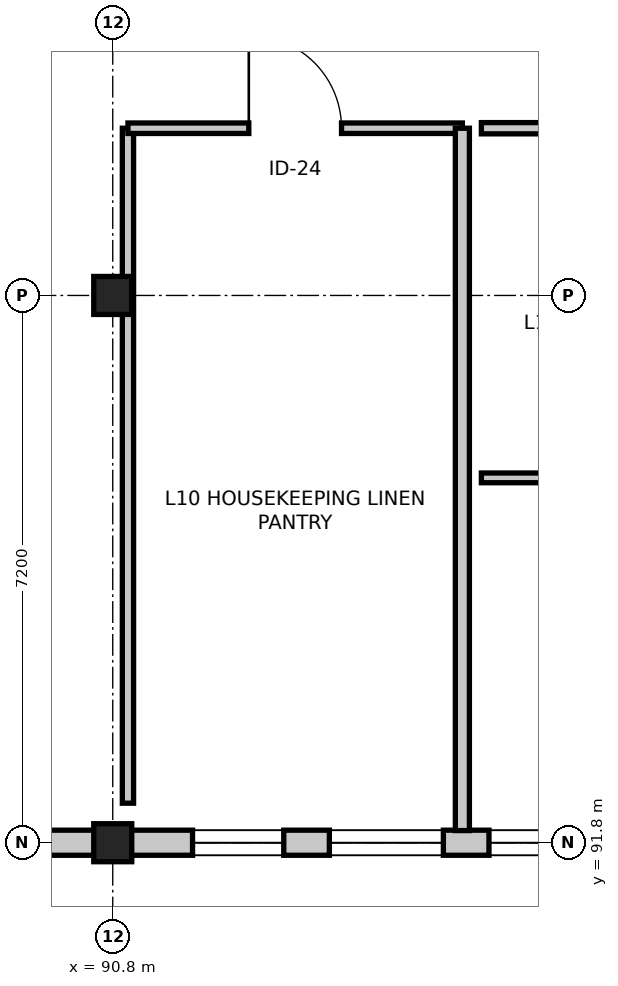
"""IFC4 building model, lengths in metres.
Left out: names, types, materials, properties, quantities, classifications, styles, units other than length and angle.
Written with IfcOpenShell. Run it as: python <this file> out.ifc"""

import sys

from ifc_helpers import new_model, si_unit, direction, frame, frame_2d, origin, origin_2d, place, context, subcontext, project, spatial, rectangle, extrude, element, fill, save


model = new_model("IFC4")
c1 = context("Model", 3, precision=1e-05, world=origin(), true_north=direction((0.0, 1.0)))
c2 = subcontext(c1, "Body", "Model", "MODEL_VIEW")
j1 = project(units=[si_unit("LENGTHUNIT", "METRE"), si_unit("PLANEANGLEUNIT", "RADIAN")], contexts=[c1])
p1 = place(None, origin())
s1 = spatial("IfcSite", under=j1, at=p1, CompositionType="ELEMENT")
p2 = place(p1, origin())
s2 = spatial("IfcBuilding", under=s1, at=p2, CompositionType="ELEMENT")
p3 = place(p2, frame((0.0, 0.0, 40.8)))
s3 = spatial("IfcBuildingStorey", under=s2, at=p3, CompositionType="ELEMENT", Elevation=40.8)
for number, where, z_axis, x_axis in (
    (1, (90.8, 91.8, 0.0), (0.0, 0.0, 1.0), (1.0, 0.0, 0.0)),
    (2, (90.8, 99.0, 0.0), (0.0, 0.0, 1.0), (1.0, 0.0, 0.0)),
):
    element("IfcColumn", number, at=place(p3, frame(where, z_axis=z_axis, x_axis=x_axis)), inside=s3, PredefinedType="COLUMN", context=c2, shape_type="SweptSolid", body=[
        extrude(rectangle(XDim=0.5, YDim=0.5, at=origin_2d()), origin(), (0.0, 0.0, 1.0), 3.6),
    ])
p4 = place(p3, frame((98.0, 91.8, 0.0), z_axis=(0.0, 0.0, 1.0), x_axis=(-1.0, 0.0, 0.0)))
e3 = element("IfcWall", 3, at=p4, inside=s3, PredefinedType="STANDARD", context=c2, shape_type="SweptSolid", body=[
    extrude(rectangle(XDim=7.2, YDim=0.33, at=frame_2d((3.6, 0.0))), origin(), (0.0, 0.0, 1.0), 2.765),
])
p5 = place(p4, frame((2.85, 0.0, 0.75)))
e4 = element("IfcOpeningElement", 4, at=p5, cuts=e3, PredefinedType="OPENING", context=c2, shape_type="SweptSolid", body=[
    extrude(rectangle(XDim=1.5, YDim=1.5, at=frame_2d((0.75, 0.75))), frame((0.0, 0.175, 0.0), z_axis=(0.0, -1.0, 0.0), x_axis=(1.0, 0.0, 0.0)), (0.0, 0.0, 1.0), 0.35),
])
p6 = place(p4, frame((1.05, 0.0, 0.85)))
e5 = element("IfcOpeningElement", 5, at=p6, cuts=e3, PredefinedType="OPENING", context=c2, shape_type="SweptSolid", body=[
    extrude(rectangle(XDim=1.2, YDim=1.8, at=frame_2d((0.6, 0.9))), frame((0.0, 0.175, 0.0), z_axis=(0.0, -1.0, 0.0), x_axis=(1.0, 0.0, 0.0)), (0.0, 0.0, 1.0), 0.35),
])
p7 = place(p4, frame((4.95, 0.0, 0.85)))
e6 = element("IfcOpeningElement", 6, at=p7, cuts=e3, PredefinedType="OPENING", context=c2, shape_type="SweptSolid", body=[
    extrude(rectangle(XDim=1.2, YDim=1.8, at=frame_2d((0.6, 0.9))), frame((0.0, 0.175, 0.0), z_axis=(0.0, -1.0, 0.0), x_axis=(1.0, 0.0, 0.0)), (0.0, 0.0, 1.0), 0.35),
])
p8 = place(p3, frame((90.8, 91.8, 0.0), z_axis=(0.0, 0.0, 1.0), x_axis=(-1.0, 0.0, 0.0)))
e7 = element("IfcWall", 7, at=p8, inside=s3, PredefinedType="STANDARD", context=c2, shape_type="SweptSolid", body=[
    extrude(rectangle(XDim=7.2, YDim=0.33, at=frame_2d((3.6, 0.0))), origin(), (0.0, 0.0, 1.0), 2.765),
])
p9 = place(p8, frame((2.85, 0.0, 0.75)))
e8 = element("IfcOpeningElement", 8, at=p9, cuts=e7, PredefinedType="OPENING", context=c2, shape_type="SweptSolid", body=[
    extrude(rectangle(XDim=1.5, YDim=1.5, at=frame_2d((0.75, 0.75))), frame((0.0, 0.175, 0.0), z_axis=(0.0, -1.0, 0.0), x_axis=(1.0, 0.0, 0.0)), (0.0, 0.0, 1.0), 0.35),
])
p10 = place(p8, frame((1.05, 0.0, 0.85)))
e9 = element("IfcOpeningElement", 9, at=p10, cuts=e7, PredefinedType="OPENING", context=c2, shape_type="SweptSolid", body=[
    extrude(rectangle(XDim=1.2, YDim=1.8, at=frame_2d((0.6, 0.9))), frame((0.0, 0.175, 0.0), z_axis=(0.0, -1.0, 0.0), x_axis=(1.0, 0.0, 0.0)), (0.0, 0.0, 1.0), 0.35),
])
p11 = place(p8, frame((4.95, 0.0, 0.85)))
e10 = element("IfcOpeningElement", 10, at=p11, cuts=e7, PredefinedType="OPENING", context=c2, shape_type="SweptSolid", body=[
    extrude(rectangle(XDim=1.2, YDim=1.8, at=frame_2d((0.6, 0.9))), frame((0.0, 0.175, 0.0), z_axis=(0.0, -1.0, 0.0), x_axis=(1.0, 0.0, 0.0)), (0.0, 0.0, 1.0), 0.35),
])
p12 = place(p3, frame((91.0, 92.32, 0.0), z_axis=(0.0, 0.0, 1.0), x_axis=(0.0, 1.0, 0.0)))
e11 = element("IfcWall", 11, at=p12, inside=s3, PredefinedType="PARTITIONING", context=c2, shape_type="SweptSolid", body=[
    extrude(rectangle(XDim=8.88, YDim=0.148, at=frame_2d((4.44, 0.0))), origin(), (0.0, 0.0, 1.0), 2.715),
])
p13 = place(p3, frame((91.0, 101.2, 0.0), z_axis=(0.0, 0.0, 1.0), x_axis=(1.0, 0.0, 0.0)))
e12 = element("IfcWall", 12, at=p13, inside=s3, PredefinedType="PARTITIONING", context=c2, shape_type="SweptSolid", body=[
    extrude(rectangle(XDim=4.4, YDim=0.138, at=frame_2d((2.2, 0.0))), origin(), (0.0, 0.0, 1.0), 2.715),
])
p14 = place(p13, frame((1.59, 0.0, 0.0)))
e13 = element("IfcOpeningElement", 13, at=p14, cuts=e12, PredefinedType="OPENING", context=c2, shape_type="SweptSolid", body=[
    extrude(rectangle(XDim=1.22, YDim=2.24, at=frame_2d((0.61, 1.12))), frame((0.0, 0.079, 0.0), z_axis=(0.0, -1.0, 0.0), x_axis=(1.0, 0.0, 0.0)), (0.0, 0.0, 1.0), 0.158),
])
p15 = place(p3, frame((95.4, 101.2, 0.0), z_axis=(0.0, 0.0, 1.0), x_axis=(0.0, -1.0, 0.0)))
e14 = element("IfcWall", 14, at=p15, inside=s3, PredefinedType="PARTITIONING", context=c2, shape_type="SweptSolid", body=[
    extrude(rectangle(XDim=9.24, YDim=0.185, at=frame_2d((4.62, 0.0))), origin(), (0.0, 0.0, 1.0), 2.765),
])
p16 = place(p3, frame((95.65, 101.2, 0.0), z_axis=(0.0, 0.0, 1.0), x_axis=(1.0, 0.0, 0.0)))
e15 = element("IfcWall", 15, at=p16, inside=s3, PredefinedType="PARTITIONING", context=c2, shape_type="SweptSolid", body=[
    extrude(rectangle(XDim=3.25, YDim=0.148, at=frame_2d((1.625, 0.0))), origin(), (0.0, 0.0, 1.0), 2.715),
])
p17 = place(p16, frame((0.945, 0.0, 0.0)))
e16 = element("IfcOpeningElement", 16, at=p17, cuts=e15, PredefinedType="OPENING", context=c2, shape_type="SweptSolid", body=[
    extrude(rectangle(XDim=1.36, YDim=2.22, at=frame_2d((0.68, 1.11))), frame((0.0, 0.084, 0.0), z_axis=(0.0, -1.0, 0.0), x_axis=(1.0, 0.0, 0.0)), (0.0, 0.0, 1.0), 0.168),
])
p18 = place(p3, frame((98.9, 96.6, 0.0), z_axis=(0.0, 0.0, 1.0), x_axis=(-1.0, 0.0, 0.0)))
e17 = element("IfcWall", 17, at=p18, inside=s3, PredefinedType="PARTITIONING", context=c2, shape_type="SweptSolid", body=[
    extrude(rectangle(XDim=3.25, YDim=0.128, at=frame_2d((1.625, 0.0))), origin(), (0.0, 0.0, 1.0), 2.715),
])
p19 = place(p5, origin())
e18 = element("IfcWindow", 18, at=p19, inside=s3, PartitioningType="SINGLE_PANEL", PredefinedType="WINDOW", context=c2, shape_type="SweptSolid", body=[
    extrude(rectangle(XDim=1.5, YDim=1.5, at=frame_2d((0.75, 0.75))), frame((0.0, 0.03, 0.0), z_axis=(0.0, -1.0, 0.0), x_axis=(1.0, 0.0, 0.0)), (0.0, 0.0, 1.0), 0.06),
])
fill(e4, e18)
p20 = place(p6, origin())
e19 = element("IfcWindow", 19, at=p20, inside=s3, PartitioningType="SINGLE_PANEL", PredefinedType="WINDOW", context=c2, shape_type="SweptSolid", body=[
    extrude(rectangle(XDim=1.2, YDim=1.8, at=frame_2d((0.6, 0.9))), frame((0.0, 0.03, 0.0), z_axis=(0.0, -1.0, 0.0), x_axis=(1.0, 0.0, 0.0)), (0.0, 0.0, 1.0), 0.06),
])
fill(e5, e19)
p21 = place(p7, origin())
e20 = element("IfcWindow", 20, at=p21, inside=s3, PartitioningType="SINGLE_PANEL", PredefinedType="WINDOW", context=c2, shape_type="SweptSolid", body=[
    extrude(rectangle(XDim=1.2, YDim=1.8, at=frame_2d((0.6, 0.9))), frame((0.0, 0.03, 0.0), z_axis=(0.0, -1.0, 0.0), x_axis=(1.0, 0.0, 0.0)), (0.0, 0.0, 1.0), 0.06),
])
fill(e6, e20)
p22 = place(p14, origin())
e21 = element("IfcDoor", 21, at=p22, inside=s3, OperationType="SINGLE_SWING_LEFT", PredefinedType="DOOR", context=c2, shape_type="SweptSolid", body=[
    extrude(rectangle(XDim=1.22, YDim=2.24, at=frame_2d((0.61, 1.12))), frame((0.0, 0.025, 0.0), z_axis=(0.0, -1.0, 0.0), x_axis=(1.0, 0.0, 0.0)), (0.0, 0.0, 1.0), 0.05),
])
fill(e13, e21)
save(model, sys.argv[1])
